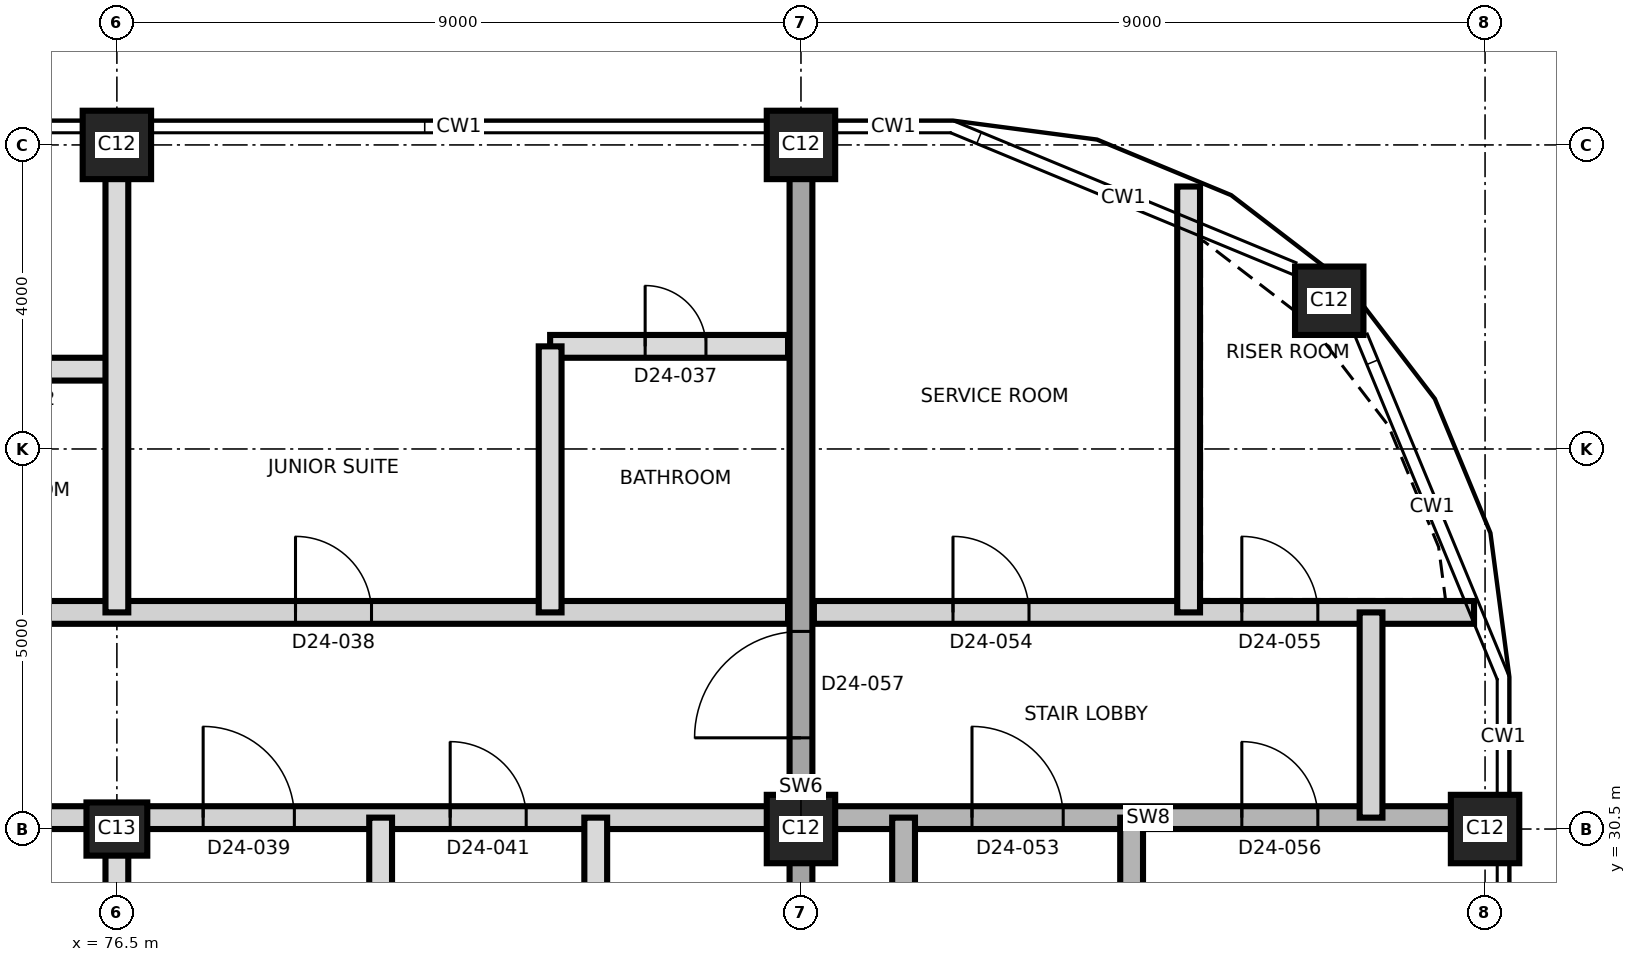
"""IFC4 building model, lengths in metres.
Left out: names, types, materials, properties, quantities, classifications, styles, units other than length and angle.
Written with IfcOpenShell. Run it as: python <this file> out.ifc"""

import sys

from ifc_helpers import new_model, si_unit, direction, frame, frame_2d, origin, origin_2d, place, context, subcontext, project, spatial, rectangle, extrude, element, fill, save


model = new_model("IFC4")
c1 = context("Model", 3, precision=1e-05, world=origin(), true_north=direction((0.0, 1.0)))
c2 = subcontext(c1, "Body", "Model", "MODEL_VIEW")
j1 = project(units=[si_unit("LENGTHUNIT", "METRE"), si_unit("PLANEANGLEUNIT", "RADIAN")], contexts=[c1])
p1 = place(None, origin())
s1 = spatial("IfcSite", under=j1, at=p1, CompositionType="ELEMENT")
p2 = place(p1, origin())
s2 = spatial("IfcBuilding", under=s1, at=p2, CompositionType="ELEMENT")
p3 = place(p2, frame((0.0, 0.0, 214.3)))
s3 = spatial("IfcBuildingStorey", under=s2, at=p3, CompositionType="ELEMENT", Elevation=214.3)
p4 = place(p3, frame((76.5, 30.5, 0.0), z_axis=(0.0, 0.0, 1.0), x_axis=(1.0, 0.0, 0.0)))
e1 = element("IfcColumn", 1, at=p4, inside=s3, PredefinedType="COLUMN", context=c2, shape_type="SweptSolid", body=[
    extrude(rectangle(XDim=0.8, YDim=0.7, at=origin_2d()), origin(), (0.0, 0.0, 1.0), 3.7),
])
for number, where, z_axis, x_axis in (
    (2, (85.5, 30.5, 0.0), (0.0, 0.0, 1.0), (1.0, 0.0, 0.0)),
    (3, (94.5, 30.5, 0.0), (0.0, 0.0, 1.0), (1.0, 0.0, 0.0)),
    (4, (92.45, 37.45, 0.0), (0.0, 0.0, 1.0), (1.0, 0.0, 0.0)),
    (5, (76.5, 39.5, 0.0), (0.0, 0.0, 1.0), (1.0, 0.0, 0.0)),
    (6, (85.5, 39.5, 0.0), (0.0, 0.0, 1.0), (1.0, 0.0, 0.0)),
):
    element("IfcColumn", number, at=place(p3, frame(where, z_axis=z_axis, x_axis=x_axis)), inside=s3, PredefinedType="COLUMN", context=c2, shape_type="SweptSolid", body=[
        extrude(rectangle(XDim=0.9, YDim=0.9, at=origin_2d()), origin(), (0.0, 0.0, 1.0), 3.7),
    ])
p5 = place(p3, frame((85.5, 21.53, 0.0), z_axis=(0.0, 0.0, 1.0), x_axis=(0.0, 1.0, 0.0)))
e7 = element("IfcWall", 7, at=p5, inside=s3, PredefinedType="SHEAR", context=c2, shape_type="SweptSolid", body=[
    extrude(rectangle(XDim=17.94, YDim=0.3, at=frame_2d((8.97, 0.0))), origin(), (0.0, 0.0, 1.0), 3.7),
])
p6 = place(p5, frame((10.17, 0.0, 0.0)))
e8 = element("IfcOpeningElement", 8, at=p6, cuts=e7, PredefinedType="OPENING", context=c2, shape_type="SweptSolid", body=[
    extrude(rectangle(XDim=1.4, YDim=2.1, at=frame_2d((0.7, 1.05))), frame((0.0, 0.16, 0.0), z_axis=(0.0, -1.0, 0.0), x_axis=(1.0, 0.0, 0.0)), (0.0, 0.0, 1.0), 0.32),
])
p7 = place(p3, frame((58.55, 30.65, 0.0), z_axis=(0.0, 0.0, 1.0), x_axis=(1.0, 0.0, 0.0)))
e9 = element("IfcWall", 9, at=p7, inside=s3, PredefinedType="PARTITIONING", context=c2, shape_type="SweptSolid", body=[
    extrude(rectangle(XDim=26.78, YDim=0.3, at=frame_2d((13.39, 0.0))), origin(), (0.0, 0.0, 1.0), 3.4),
])
p8 = place(p7, frame((2.3, 0.0, 0.0)))
e10 = element("IfcOpeningElement", 10, at=p8, cuts=e9, PredefinedType="OPENING", context=c2, shape_type="SweptSolid", body=[
    extrude(rectangle(XDim=1.0, YDim=2.4, at=frame_2d((0.5, 1.2))), frame((0.0, 0.16, 0.0), z_axis=(0.0, -1.0, 0.0), x_axis=(1.0, 0.0, 0.0)), (0.0, 0.0, 1.0), 0.32),
])
p9 = place(p7, frame((10.1, 0.0, 0.0)))
e11 = element("IfcOpeningElement", 11, at=p9, cuts=e9, PredefinedType="OPENING", context=c2, shape_type="SweptSolid", body=[
    extrude(rectangle(XDim=1.0, YDim=2.1, at=frame_2d((0.5, 1.05))), frame((0.0, 0.16, 0.0), z_axis=(0.0, -1.0, 0.0), x_axis=(1.0, 0.0, 0.0)), (0.0, 0.0, 1.0), 0.32),
])
p10 = place(p7, frame((15.95, 0.0, 0.0)))
e12 = element("IfcOpeningElement", 12, at=p10, cuts=e9, PredefinedType="OPENING", context=c2, shape_type="SweptSolid", body=[
    extrude(rectangle(XDim=1.0, YDim=2.1, at=frame_2d((0.5, 1.05))), frame((0.0, 0.16, 0.0), z_axis=(0.0, -1.0, 0.0), x_axis=(1.0, 0.0, 0.0)), (0.0, 0.0, 1.0), 0.32),
])
p11 = place(p7, frame((19.085, 0.0, 0.0)))
e13 = element("IfcOpeningElement", 13, at=p11, cuts=e9, PredefinedType="OPENING", context=c2, shape_type="SweptSolid", body=[
    extrude(rectangle(XDim=1.2, YDim=2.1, at=frame_2d((0.6, 1.05))), frame((0.0, 0.16, 0.0), z_axis=(0.0, -1.0, 0.0), x_axis=(1.0, 0.0, 0.0)), (0.0, 0.0, 1.0), 0.32),
])
p12 = place(p7, frame((22.335, 0.0, 0.0)))
e14 = element("IfcOpeningElement", 14, at=p12, cuts=e9, PredefinedType="OPENING", context=c2, shape_type="SweptSolid", body=[
    extrude(rectangle(XDim=1.0, YDim=2.1, at=frame_2d((0.5, 1.05))), frame((0.0, 0.16, 0.0), z_axis=(0.0, -1.0, 0.0), x_axis=(1.0, 0.0, 0.0)), (0.0, 0.0, 1.0), 0.32),
])
p13 = place(p3, frame((85.67, 30.65, 0.0), z_axis=(0.0, 0.0, 1.0), x_axis=(1.0, 0.0, 0.0)))
e15 = element("IfcWall", 15, at=p13, inside=s3, PredefinedType="SHEAR", context=c2, shape_type="SweptSolid", body=[
    extrude(rectangle(XDim=8.8, YDim=0.3, at=frame_2d((4.4, 0.0))), origin(), (0.0, 0.0, 1.0), 3.4),
])
p14 = place(p13, frame((2.08, 0.0, 0.0)))
e16 = element("IfcOpeningElement", 16, at=p14, cuts=e15, PredefinedType="OPENING", context=c2, shape_type="SweptSolid", body=[
    extrude(rectangle(XDim=1.2, YDim=2.1, at=frame_2d((0.6, 1.05))), frame((0.0, 0.16, 0.0), z_axis=(0.0, -1.0, 0.0), x_axis=(1.0, 0.0, 0.0)), (0.0, 0.0, 1.0), 0.32),
])
p15 = place(p13, frame((5.63, 0.0, 0.0)))
e17 = element("IfcOpeningElement", 17, at=p15, cuts=e15, PredefinedType="OPENING", context=c2, shape_type="SweptSolid", body=[
    extrude(rectangle(XDim=1.0, YDim=2.1, at=frame_2d((0.5, 1.05))), frame((0.0, 0.16, 0.0), z_axis=(0.0, -1.0, 0.0), x_axis=(1.0, 0.0, 0.0)), (0.0, 0.0, 1.0), 0.32),
])
p16 = place(p3, frame((58.55, 33.35, 0.0), z_axis=(0.0, 0.0, 1.0), x_axis=(1.0, 0.0, 0.0)))
e18 = element("IfcWall", 18, at=p16, inside=s3, PredefinedType="PARTITIONING", context=c2, shape_type="SweptSolid", body=[
    extrude(rectangle(XDim=26.78, YDim=0.3, at=frame_2d((13.39, 0.0))), origin(), (0.0, 0.0, 1.0), 3.4),
])
p17 = place(p16, frame((3.95, 0.0, 0.0)))
e19 = element("IfcOpeningElement", 19, at=p17, cuts=e18, PredefinedType="OPENING", context=c2, shape_type="SweptSolid", body=[
    extrude(rectangle(XDim=1.0, YDim=2.4, at=frame_2d((0.5, 1.2))), frame((0.0, 0.16, 0.0), z_axis=(0.0, -1.0, 0.0), x_axis=(1.0, 0.0, 0.0)), (0.0, 0.0, 1.0), 0.32),
])
p18 = place(p16, frame((12.05, 0.0, 0.0)))
e20 = element("IfcOpeningElement", 20, at=p18, cuts=e18, PredefinedType="OPENING", context=c2, shape_type="SweptSolid", body=[
    extrude(rectangle(XDim=1.0, YDim=2.1, at=frame_2d((0.5, 1.05))), frame((0.0, 0.16, 0.0), z_axis=(0.0, -1.0, 0.0), x_axis=(1.0, 0.0, 0.0)), (0.0, 0.0, 1.0), 0.32),
])
p19 = place(p16, frame((13.85, 0.0, 0.0)))
e21 = element("IfcOpeningElement", 21, at=p19, cuts=e18, PredefinedType="OPENING", context=c2, shape_type="SweptSolid", body=[
    extrude(rectangle(XDim=1.0, YDim=2.1, at=frame_2d((0.5, 1.05))), frame((0.0, 0.16, 0.0), z_axis=(0.0, -1.0, 0.0), x_axis=(1.0, 0.0, 0.0)), (0.0, 0.0, 1.0), 0.32),
])
p20 = place(p16, frame((20.3, 0.0, 0.0)))
e22 = element("IfcOpeningElement", 22, at=p20, cuts=e18, PredefinedType="OPENING", context=c2, shape_type="SweptSolid", body=[
    extrude(rectangle(XDim=1.0, YDim=2.4, at=frame_2d((0.5, 1.2))), frame((0.0, 0.16, 0.0), z_axis=(0.0, -1.0, 0.0), x_axis=(1.0, 0.0, 0.0)), (0.0, 0.0, 1.0), 0.32),
])
p21 = place(p3, frame((85.67, 33.35, 0.0), z_axis=(0.0, 0.0, 1.0), x_axis=(1.0, 0.0, 0.0)))
e23 = element("IfcWall", 23, at=p21, inside=s3, PredefinedType="PARTITIONING", context=c2, shape_type="SweptSolid", body=[
    extrude(rectangle(XDim=8.685, YDim=0.3, at=frame_2d((4.343, 0.0))), origin(), (0.0, 0.0, 1.0), 3.4),
])
p22 = place(p21, frame((1.83, 0.0, 0.0)))
e24 = element("IfcOpeningElement", 24, at=p22, cuts=e23, PredefinedType="OPENING", context=c2, shape_type="SweptSolid", body=[
    extrude(rectangle(XDim=1.0, YDim=2.1, at=frame_2d((0.5, 1.05))), frame((0.0, 0.16, 0.0), z_axis=(0.0, -1.0, 0.0), x_axis=(1.0, 0.0, 0.0)), (0.0, 0.0, 1.0), 0.32),
])
p23 = place(p21, frame((5.63, 0.0, 0.0)))
e25 = element("IfcOpeningElement", 25, at=p23, cuts=e23, PredefinedType="OPENING", context=c2, shape_type="SweptSolid", body=[
    extrude(rectangle(XDim=1.0, YDim=2.1, at=frame_2d((0.5, 1.05))), frame((0.0, 0.16, 0.0), z_axis=(0.0, -1.0, 0.0), x_axis=(1.0, 0.0, 0.0)), (0.0, 0.0, 1.0), 0.32),
])
p24 = place(p3, frame((73.8, 36.55, 0.0), z_axis=(0.0, 0.0, 1.0), x_axis=(1.0, 0.0, 0.0)))
e26 = element("IfcWall", 26, at=p24, inside=s3, PredefinedType="PARTITIONING", context=c2, shape_type="SweptSolid", body=[
    extrude(rectangle(XDim=2.7, YDim=0.3, at=frame_2d((1.35, 0.0))), origin(), (0.0, 0.0, 1.0), 3.4),
])
p25 = place(p24, frame((0.95, 0.0, 0.0)))
e27 = element("IfcOpeningElement", 27, at=p25, cuts=e26, PredefinedType="OPENING", context=c2, shape_type="SweptSolid", body=[
    extrude(rectangle(XDim=0.8, YDim=2.1, at=frame_2d((0.4, 1.05))), frame((0.0, 0.16, 0.0), z_axis=(0.0, -1.0, 0.0), x_axis=(1.0, 0.0, 0.0)), (0.0, 0.0, 1.0), 0.32),
])
p26 = place(p3, frame((82.2, 36.85, 0.0), z_axis=(0.0, 0.0, 1.0), x_axis=(1.0, 0.0, 0.0)))
e28 = element("IfcWall", 28, at=p26, inside=s3, PredefinedType="PARTITIONING", context=c2, shape_type="SweptSolid", body=[
    extrude(rectangle(XDim=3.13, YDim=0.3, at=frame_2d((1.565, 0.0))), origin(), (0.0, 0.0, 1.0), 3.4),
])
p27 = place(p26, frame((1.25, 0.0, 0.0)))
e29 = element("IfcOpeningElement", 29, at=p27, cuts=e28, PredefinedType="OPENING", context=c2, shape_type="SweptSolid", body=[
    extrude(rectangle(XDim=0.8, YDim=2.1, at=frame_2d((0.4, 1.05))), frame((0.0, 0.16, 0.0), z_axis=(0.0, -1.0, 0.0), x_axis=(1.0, 0.0, 0.0)), (0.0, 0.0, 1.0), 0.32),
])
p28 = place(p3, frame((76.5, 21.53, 0.0), z_axis=(0.0, 0.0, 1.0), x_axis=(0.0, 1.0, 0.0)))
e30 = element("IfcWall", 30, at=p28, inside=s3, PredefinedType="PARTITIONING", context=c2, shape_type="SweptSolid", body=[
    extrude(rectangle(XDim=9.12, YDim=0.3, at=frame_2d((4.56, 0.0))), origin(), (0.0, 0.0, 1.0), 3.4),
])
p29 = place(p3, frame((76.5, 33.35, 0.0), z_axis=(0.0, 0.0, 1.0), x_axis=(0.0, 1.0, 0.0)))
e31 = element("IfcWall", 31, at=p29, inside=s3, PredefinedType="PARTITIONING", context=c2, shape_type="SweptSolid", body=[
    extrude(rectangle(XDim=6.12, YDim=0.3, at=frame_2d((3.06, 0.0))), origin(), (0.0, 0.0, 1.0), 3.4),
])
p30 = place(p3, frame((79.97, 21.53, 0.0), z_axis=(0.0, 0.0, 1.0), x_axis=(0.0, 1.0, 0.0)))
e32 = element("IfcWall", 32, at=p30, inside=s3, PredefinedType="PARTITIONING", context=c2, shape_type="SweptSolid", body=[
    extrude(rectangle(XDim=9.12, YDim=0.3, at=frame_2d((4.56, 0.0))), origin(), (0.0, 0.0, 1.0), 3.4),
])
p31 = place(p3, frame((82.2, 33.35, 0.0), z_axis=(0.0, 0.0, 1.0), x_axis=(0.0, 1.0, 0.0)))
e33 = element("IfcWall", 33, at=p31, inside=s3, PredefinedType="PARTITIONING", context=c2, shape_type="SweptSolid", body=[
    extrude(rectangle(XDim=3.5, YDim=0.3, at=frame_2d((1.75, 0.0))), origin(), (0.0, 0.0, 1.0), 3.4),
])
p32 = place(p3, frame((82.8, 27.45, 0.0), z_axis=(0.0, 0.0, 1.0), x_axis=(0.0, 1.0, 0.0)))
e34 = element("IfcWall", 34, at=p32, inside=s3, PredefinedType="PARTITIONING", context=c2, shape_type="SweptSolid", body=[
    extrude(rectangle(XDim=3.2, YDim=0.3, at=frame_2d((1.6, 0.0))), origin(), (0.0, 0.0, 1.0), 3.4),
])
p33 = place(p3, frame((86.85, 21.8, 0.0), z_axis=(0.0, 0.0, 1.0), x_axis=(0.0, 1.0, 0.0)))
e35 = element("IfcWall", 35, at=p33, inside=s3, PredefinedType="SHEAR", context=c2, shape_type="SweptSolid", body=[
    extrude(rectangle(XDim=8.85, YDim=0.3, at=frame_2d((4.425, 0.0))), origin(), (0.0, 0.0, 1.0), 3.4),
])
p34 = place(p3, frame((89.85, 21.997, 0.0), z_axis=(0.0, 0.0, 1.0), x_axis=(0.0, 1.0, 0.0)))
e36 = element("IfcWall", 36, at=p34, inside=s3, PredefinedType="SHEAR", context=c2, shape_type="SweptSolid", body=[
    extrude(rectangle(XDim=8.653, YDim=0.3, at=frame_2d((4.326, 0.0))), origin(), (0.0, 0.0, 1.0), 3.4),
])
p35 = place(p3, frame((90.6, 33.35, 0.0), z_axis=(0.0, 0.0, 1.0), x_axis=(0.0, 1.0, 0.0)))
e37 = element("IfcWall", 37, at=p35, inside=s3, PredefinedType="PARTITIONING", context=c2, shape_type="SweptSolid", body=[
    extrude(rectangle(XDim=5.603, YDim=0.3, at=frame_2d((2.801, 0.0))), origin(), (0.0, 0.0, 1.0), 3.4),
])
p36 = place(p3, frame((93.0, 30.65, 0.0), z_axis=(0.0, 0.0, 1.0), x_axis=(0.0, 1.0, 0.0)))
e38 = element("IfcWall", 38, at=p36, inside=s3, PredefinedType="PARTITIONING", context=c2, shape_type="SweptSolid", body=[
    extrude(rectangle(XDim=2.7, YDim=0.3, at=frame_2d((1.35, 0.0))), origin(), (0.0, 0.0, 1.0), 3.4),
])
p37 = place(p27, origin())
e39 = element("IfcDoor", 39, at=p37, inside=s3, OperationType="SINGLE_SWING_LEFT", PredefinedType="DOOR", context=c2, shape_type="SweptSolid", body=[
    extrude(rectangle(XDim=0.8, YDim=2.1, at=frame_2d((0.4, 1.05))), frame((0.0, 0.025, 0.0), z_axis=(0.0, -1.0, 0.0), x_axis=(1.0, 0.0, 0.0)), (0.0, 0.0, 1.0), 0.05),
])
fill(e29, e39)
p38 = place(p20, origin())
e40 = element("IfcDoor", 40, at=p38, inside=s3, OperationType="SINGLE_SWING_LEFT", PredefinedType="DOOR", context=c2, shape_type="SweptSolid", body=[
    extrude(rectangle(XDim=1.0, YDim=2.4, at=frame_2d((0.5, 1.2))), frame((0.0, 0.025, 0.0), z_axis=(0.0, -1.0, 0.0), x_axis=(1.0, 0.0, 0.0)), (0.0, 0.0, 1.0), 0.05),
])
fill(e22, e40)
p39 = place(p11, origin())
e41 = element("IfcDoor", 41, at=p39, inside=s3, OperationType="SINGLE_SWING_RIGHT", PredefinedType="DOOR", context=c2, shape_type="SweptSolid", body=[
    extrude(rectangle(XDim=1.2, YDim=2.1, at=frame_2d((0.6, 1.05))), frame((0.0, 0.025, 0.0), z_axis=(0.0, -1.0, 0.0), x_axis=(1.0, 0.0, 0.0)), (0.0, 0.0, 1.0), 0.05),
])
fill(e13, e41)
p40 = place(p12, origin())
e42 = element("IfcDoor", 42, at=p40, inside=s3, OperationType="SINGLE_SWING_LEFT", PredefinedType="DOOR", context=c2, shape_type="SweptSolid", body=[
    extrude(rectangle(XDim=1.0, YDim=2.1, at=frame_2d((0.5, 1.05))), frame((0.0, 0.025, 0.0), z_axis=(0.0, -1.0, 0.0), x_axis=(1.0, 0.0, 0.0)), (0.0, 0.0, 1.0), 0.05),
])
fill(e14, e42)
p41 = place(p14, origin())
e43 = element("IfcDoor", 43, at=p41, inside=s3, OperationType="SINGLE_SWING_LEFT", PredefinedType="DOOR", context=c2, shape_type="SweptSolid", body=[
    extrude(rectangle(XDim=1.2, YDim=2.1, at=frame_2d((0.6, 1.05))), frame((0.0, 0.025, 0.0), z_axis=(0.0, -1.0, 0.0), x_axis=(1.0, 0.0, 0.0)), (0.0, 0.0, 1.0), 0.05),
])
fill(e16, e43)
p42 = place(p22, origin())
e44 = element("IfcDoor", 44, at=p42, inside=s3, OperationType="SINGLE_SWING_LEFT", PredefinedType="DOOR", context=c2, shape_type="SweptSolid", body=[
    extrude(rectangle(XDim=1.0, YDim=2.1, at=frame_2d((0.5, 1.05))), frame((0.0, 0.025, 0.0), z_axis=(0.0, -1.0, 0.0), x_axis=(1.0, 0.0, 0.0)), (0.0, 0.0, 1.0), 0.05),
])
fill(e24, e44)
p43 = place(p23, origin())
e45 = element("IfcDoor", 45, at=p43, inside=s3, OperationType="SINGLE_SWING_RIGHT", PredefinedType="DOOR", context=c2, shape_type="SweptSolid", body=[
    extrude(rectangle(XDim=1.0, YDim=2.1, at=frame_2d((0.5, 1.05))), frame((0.0, 0.025, 0.0), z_axis=(0.0, -1.0, 0.0), x_axis=(1.0, 0.0, 0.0)), (0.0, 0.0, 1.0), 0.05),
])
fill(e25, e45)
p44 = place(p15, origin())
e46 = element("IfcDoor", 46, at=p44, inside=s3, OperationType="SINGLE_SWING_LEFT", PredefinedType="DOOR", context=c2, shape_type="SweptSolid", body=[
    extrude(rectangle(XDim=1.0, YDim=2.1, at=frame_2d((0.5, 1.05))), frame((0.0, 0.025, 0.0), z_axis=(0.0, -1.0, 0.0), x_axis=(1.0, 0.0, 0.0)), (0.0, 0.0, 1.0), 0.05),
])
fill(e17, e46)
p45 = place(p6, origin())
e47 = element("IfcDoor", 47, at=p45, inside=s3, OperationType="SINGLE_SWING_RIGHT", PredefinedType="DOOR", context=c2, shape_type="SweptSolid", body=[
    extrude(rectangle(XDim=1.4, YDim=2.1, at=frame_2d((0.7, 1.05))), frame((0.0, 0.025, 0.0), z_axis=(0.0, -1.0, 0.0), x_axis=(1.0, 0.0, 0.0)), (0.0, 0.0, 1.0), 0.05),
])
fill(e8, e47)
save(model, sys.argv[1])
